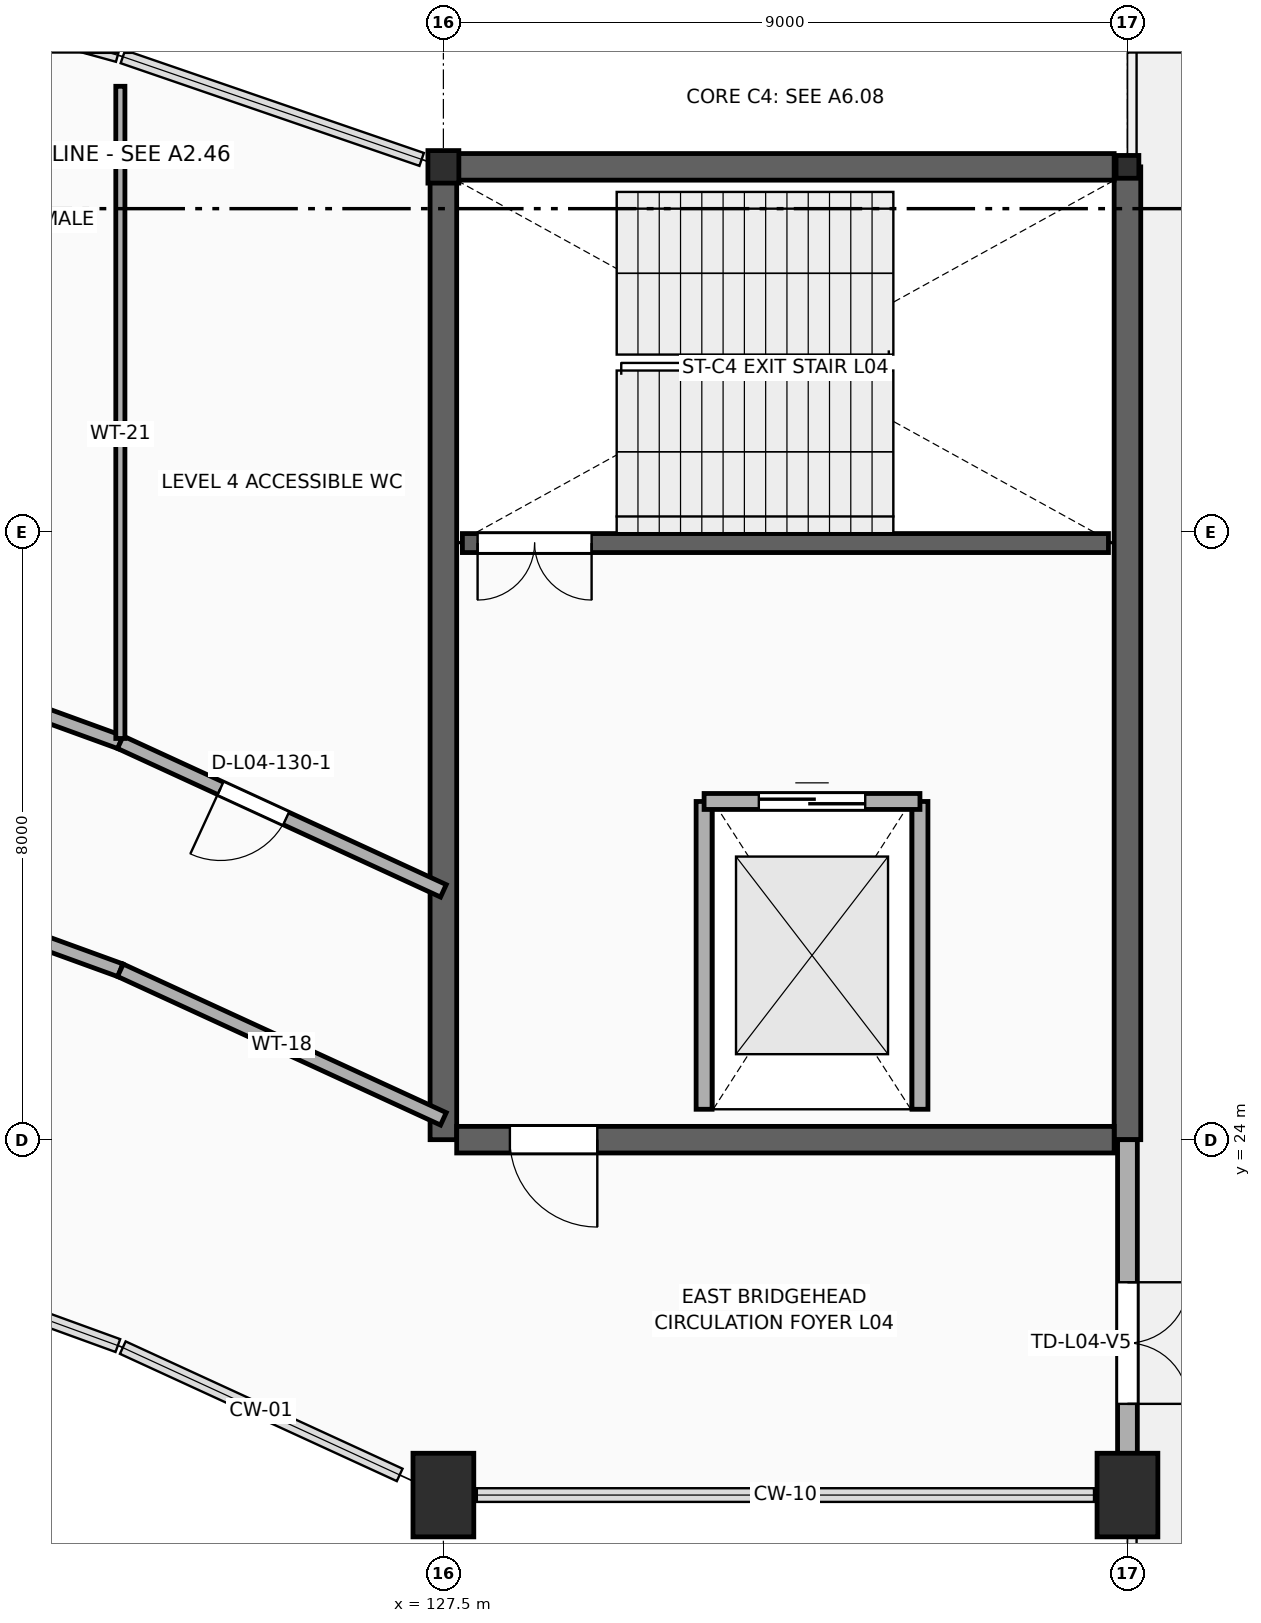
"""IFC4 building model, lengths in metres.
Left out: names, types, materials, properties, quantities, classifications, styles, units other than length and angle.
Written with IfcOpenShell. Run it as: python <this file> out.ifc"""

import sys

from ifc_helpers import new_model, si_unit, direction, frame, frame_2d, origin, origin_2d, place, context, subcontext, project, spatial, rectangle, i_section, extrude, element, fill, save


model = new_model("IFC4")
c1 = context("Model", 3, precision=1e-05, world=origin(), true_north=direction((0.0, 1.0)))
c2 = subcontext(c1, "Body", "Model", "MODEL_VIEW")
j1 = project(units=[si_unit("LENGTHUNIT", "METRE"), si_unit("PLANEANGLEUNIT", "RADIAN")], contexts=[c1])
p1 = place(None, origin())
s1 = spatial("IfcSite", under=j1, at=p1, CompositionType="ELEMENT")
p2 = place(p1, origin())
s2 = spatial("IfcBuilding", under=s1, at=p2, CompositionType="ELEMENT")
p3 = place(p2, frame((0.0, 0.0, 19.8)))
s3 = spatial("IfcBuildingStorey", under=s2, at=p3, CompositionType="ELEMENT", Elevation=19.8)
for number, where, z_axis, x_axis in (
    (1, (127.5, 24.0, 0.0), (0.0, 0.0, 1.0), (0.0, 1.0, 0.0)),
    (2, (136.5, 24.0, 0.0), (0.0, 0.0, 1.0), (0.0, 1.0, 0.0)),
):
    element("IfcWall", number, at=place(p3, frame(where, z_axis=z_axis, x_axis=x_axis)), inside=s3, PredefinedType="SHEAR", context=c2, shape_type="SweptSolid", body=[
        extrude(rectangle(XDim=12.8, YDim=0.35, at=frame_2d((6.4, 0.0))), origin(), (0.0, 0.0, 1.0), 4.64),
    ])
p4 = place(p3, frame((127.675, 36.8, 0.0), z_axis=(0.0, 0.0, 1.0), x_axis=(1.0, 0.0, 0.0)))
e3 = element("IfcWall", 3, at=p4, inside=s3, PredefinedType="SHEAR", context=c2, shape_type="SweptSolid", body=[
    extrude(rectangle(XDim=8.65, YDim=0.35, at=frame_2d((4.325, 0.0))), origin(), (0.0, 0.0, 1.0), 4.64),
])
p5 = place(p3, frame((127.675, 24.0, 0.0), z_axis=(0.0, 0.0, 1.0), x_axis=(1.0, 0.0, 0.0)))
e4 = element("IfcWall", 4, at=p5, inside=s3, PredefinedType="SHEAR", context=c2, shape_type="SweptSolid", body=[
    extrude(rectangle(XDim=8.65, YDim=0.35, at=frame_2d((4.325, 0.0))), origin(), (0.0, 0.0, 1.0), 4.64),
])
p6 = place(p5, frame((0.7, 0.0, 0.0)))
e5 = element("IfcOpeningElement", 5, at=p6, cuts=e4, PredefinedType="OPENING", context=c2, shape_type="SweptSolid", body=[
    extrude(rectangle(XDim=1.15, YDim=2.2, at=frame_2d((0.575, 1.1))), frame((0.0, 0.187, 0.0), z_axis=(0.0, -1.0, 0.0), x_axis=(1.0, 0.0, 0.0)), (0.0, 0.0, 1.0), 0.374),
])
p7 = place(p3, frame((127.75, 31.85, 0.0), z_axis=(0.0, 0.0, 1.0), x_axis=(1.0, 0.0, 0.0)))
e6 = element("IfcWall", 6, at=p7, inside=s3, PredefinedType="STANDARD", context=c2, shape_type="SweptSolid", body=[
    extrude(rectangle(XDim=8.5, YDim=0.25, at=frame_2d((4.25, 0.0))), origin(), (0.0, 0.0, 1.0), 4.64),
])
p8 = place(p7, frame((0.2, 0.0, 0.0)))
e7 = element("IfcOpeningElement", 7, at=p8, cuts=e6, PredefinedType="OPENING", context=c2, shape_type="SweptSolid", body=[
    extrude(rectangle(XDim=1.5, YDim=2.2, at=frame_2d((0.75, 1.1))), frame((0.0, 0.137, 0.0), z_axis=(0.0, -1.0, 0.0), x_axis=(1.0, 0.0, 0.0)), (0.0, 0.0, 1.0), 0.274),
])
for number, where, z_axis, x_axis in (
    (8, (130.93, 24.4, 0.0), (0.0, 0.0, 1.0), (0.0, 1.0, 0.0)),
    (9, (133.77, 24.4, 0.0), (0.0, 0.0, 1.0), (0.0, 1.0, 0.0)),
):
    element("IfcWall", number, at=place(p3, frame(where, z_axis=z_axis, x_axis=x_axis)), inside=s3, PredefinedType="PARTITIONING", context=c2, shape_type="SweptSolid", body=[
        extrude(rectangle(XDim=4.05, YDim=0.21, at=frame_2d((2.025, 0.0))), origin(), (0.0, 0.0, 1.0), 4.64),
    ])
p9 = place(p3, frame((130.93, 28.45, 0.0), z_axis=(0.0, 0.0, 1.0), x_axis=(1.0, 0.0, 0.0)))
e10 = element("IfcWall", 10, at=p9, inside=s3, PredefinedType="PARTITIONING", context=c2, shape_type="SweptSolid", body=[
    extrude(rectangle(XDim=2.84, YDim=0.21, at=frame_2d((1.42, 0.0))), origin(), (0.0, 0.0, 1.0), 4.64),
])
p10 = place(p9, frame((0.72, 0.0, 0.0)))
e11 = element("IfcOpeningElement", 11, at=p10, cuts=e10, PredefinedType="OPENING", context=c2, shape_type="SweptSolid", body=[
    extrude(rectangle(XDim=1.4, YDim=2.35, at=frame_2d((0.7, 1.175))), frame((0.0, 0.117, 0.0), z_axis=(0.0, -1.0, 0.0), x_axis=(1.0, 0.0, 0.0)), (0.0, 0.0, 1.0), 0.234),
])
p11 = place(p3, frame((127.5, 36.8, 0.0), z_axis=(0.0, 0.0, 1.0), x_axis=(1.0, 0.0, 0.0)))
e12 = element("IfcColumn", 12, at=p11, inside=s3, PredefinedType="COLUMN", context=c2, shape_type="SweptSolid", body=[
    extrude(i_section(OverallWidth=0.407, OverallDepth=0.428, WebThickness=0.02, FlangeThickness=0.035, at=origin_2d()), origin(), (0.0, 0.0, 1.0), 4.54),
])
p12 = place(p3, frame((136.5, 36.8, 0.0), z_axis=(0.0, 0.0, 1.0), x_axis=(1.0, 0.0, 0.0)))
e13 = element("IfcColumn", 13, at=p12, inside=s3, PredefinedType="COLUMN", context=c2, shape_type="SweptSolid", body=[
    extrude(i_section(OverallWidth=0.3, OverallDepth=0.3, WebThickness=0.01, FlangeThickness=0.015, at=origin_2d()), origin(), (0.0, 0.0, 1.0), 4.54),
])
for number, where, z_axis, x_axis in (
    (14, (136.5, 19.324, 0.0), (0.0, 0.0, 1.0), (1.0, 0.0, 0.0)),
    (15, (127.5, 19.324, 0.0), (0.0, 0.0, 1.0), (1.0, 0.0, 0.0)),
):
    element("IfcColumn", number, at=place(p3, frame(where, z_axis=z_axis, x_axis=x_axis)), inside=s3, PredefinedType="COLUMN", context=c2, shape_type="SweptSolid", body=[
        extrude(rectangle(XDim=0.8, YDim=1.1, at=origin_2d()), origin(), (0.0, 0.0, 1.0), 4.54),
    ])
p13 = place(p3, frame((136.5, 19.324, 0.0), z_axis=(0.0, 0.0, 1.0), x_axis=(0.0, 1.0, 0.0)))
e16 = element("IfcWall", 16, at=p13, inside=s3, PredefinedType="STANDARD", context=c2, shape_type="SweptSolid", body=[
    extrude(rectangle(XDim=4.676, YDim=0.26, at=frame_2d((2.338, 0.0))), origin(), (0.0, 0.0, 1.0), 4.168),
])
p14 = place(p13, frame((1.2, 0.0, 0.0)))
e17 = element("IfcOpeningElement", 17, at=p14, cuts=e16, PredefinedType="OPENING", context=c2, shape_type="SweptSolid", body=[
    extrude(rectangle(XDim=1.6, YDim=2.3, at=frame_2d((0.8, 1.15))), frame((0.0, 0.142, 0.0), z_axis=(0.0, -1.0, 0.0), x_axis=(1.0, 0.0, 0.0)), (0.0, 0.0, 1.0), 0.284),
])
p15 = place(p3, frame((119.0, 27.774, 0.0), z_axis=(0.0, 0.0, 1.0), x_axis=(0.939831249065, -0.341639024821, 0.0)))
e18 = element("IfcWall", 18, at=p15, inside=s3, PredefinedType="PARTITIONING", context=c2, shape_type="SweptSolid", body=[
    extrude(rectangle(XDim=4.522, YDim=0.18, at=frame_2d((2.261, 0.0))), origin(), (0.0, 0.0, 1.0), 3.668),
])
p16 = place(p3, frame((119.0, 30.774, 0.0), z_axis=(0.0, 0.0, 1.0), x_axis=(0.939831249065, -0.341639024821, 0.0)))
e19 = element("IfcWall", 19, at=p16, inside=s3, PredefinedType="PARTITIONING", context=c2, shape_type="SweptSolid", body=[
    extrude(rectangle(XDim=4.522, YDim=0.18, at=frame_2d((2.261, 0.0))), origin(), (0.0, 0.0, 1.0), 3.668),
])
p17 = place(p16, frame((1.45, 0.0, 0.0)))
e20 = element("IfcOpeningElement", 20, at=p17, cuts=e19, PredefinedType="OPENING", context=c2, shape_type="SweptSolid", body=[
    extrude(rectangle(XDim=0.9, YDim=2.15, at=frame_2d((0.45, 1.075))), frame((0.0, 0.102, 0.0), z_axis=(0.0, -1.0, 0.0), x_axis=(1.0, 0.0, 0.0)), (0.0, 0.0, 1.0), 0.204),
])
p18 = place(p3, frame((123.25, 26.229, 0.0), z_axis=(0.0, 0.0, 1.0), x_axis=(0.908484112169, -0.417919391673, 0.0)))
e21 = element("IfcWall", 21, at=p18, inside=s3, PredefinedType="PARTITIONING", context=c2, shape_type="SweptSolid", body=[
    extrude(rectangle(XDim=4.678, YDim=0.18, at=frame_2d((2.339, 0.0))), origin(), (0.0, 0.0, 1.0), 3.668),
])
p19 = place(p3, frame((123.25, 29.229, 0.0), z_axis=(0.0, 0.0, 1.0), x_axis=(0.908484112169, -0.417919391673, 0.0)))
e22 = element("IfcWall", 22, at=p19, inside=s3, PredefinedType="PARTITIONING", context=c2, shape_type="SweptSolid", body=[
    extrude(rectangle(XDim=4.678, YDim=0.18, at=frame_2d((2.339, 0.0))), origin(), (0.0, 0.0, 1.0), 3.668),
])
p20 = place(p19, frame((1.45, 0.0, 0.0)))
e23 = element("IfcOpeningElement", 23, at=p20, cuts=e22, PredefinedType="OPENING", context=c2, shape_type="SweptSolid", body=[
    extrude(rectangle(XDim=0.95, YDim=2.15, at=frame_2d((0.475, 1.075))), frame((0.0, 0.102, 0.0), z_axis=(0.0, -1.0, 0.0), x_axis=(1.0, 0.0, 0.0)), (0.0, 0.0, 1.0), 0.204),
])
p21 = place(p3, frame((123.25, 29.279, 0.0), z_axis=(0.0, 0.0, 1.0), x_axis=(0.0, 1.0, 0.0)))
e24 = element("IfcWall", 24, at=p21, inside=s3, PredefinedType="PARTITIONING", context=c2, shape_type="SweptSolid", body=[
    extrude(rectangle(XDim=8.581, YDim=0.12, at=frame_2d((4.291, 0.0))), origin(), (0.0, 0.0, 1.0), 3.668),
])
p22 = place(p8, frame((1.5, 0.0, 0.0), z_axis=(0.0, 0.0, 1.0), x_axis=(-1.0, 0.0, 0.0)))
e25 = element("IfcDoor", 25, at=p22, inside=s3, OperationType="DOUBLE_DOOR_SINGLE_SWING", PredefinedType="DOOR", context=c2, shape_type="SweptSolid", body=[
    extrude(rectangle(XDim=1.5, YDim=2.2, at=frame_2d((0.75, 1.1))), frame((0.0, 0.025, 0.0), z_axis=(0.0, -1.0, 0.0), x_axis=(1.0, 0.0, 0.0)), (0.0, 0.0, 1.0), 0.05),
])
fill(e7, e25)
p23 = place(p10, origin())
e26 = element("IfcDoor", 26, at=p23, inside=s3, OperationType="DOUBLE_DOOR_SLIDING", PredefinedType="DOOR", context=c2, shape_type="SweptSolid", body=[
    extrude(rectangle(XDim=1.4, YDim=2.35, at=frame_2d((0.7, 1.175))), frame((0.0, 0.025, 0.0), z_axis=(0.0, -1.0, 0.0), x_axis=(1.0, 0.0, 0.0)), (0.0, 0.0, 1.0), 0.05),
])
fill(e11, e26)
p24 = place(p6, frame((1.15, 0.0, 0.0), z_axis=(0.0, 0.0, 1.0), x_axis=(-1.0, 0.0, 0.0)))
e27 = element("IfcDoor", 27, at=p24, inside=s3, OperationType="SINGLE_SWING_RIGHT", PredefinedType="DOOR", context=c2, shape_type="SweptSolid", body=[
    extrude(rectangle(XDim=1.15, YDim=2.2, at=frame_2d((0.575, 1.1))), frame((0.0, 0.025, 0.0), z_axis=(0.0, -1.0, 0.0), x_axis=(1.0, 0.0, 0.0)), (0.0, 0.0, 1.0), 0.05),
])
fill(e5, e27)
p25 = place(p14, frame((1.6, 0.0, 0.0), z_axis=(0.0, 0.0, 1.0), x_axis=(-1.0, 0.0, 0.0)))
e28 = element("IfcDoor", 28, at=p25, inside=s3, OperationType="DOUBLE_DOOR_SINGLE_SWING", PredefinedType="DOOR", context=c2, shape_type="SweptSolid", body=[
    extrude(rectangle(XDim=1.6, YDim=2.3, at=frame_2d((0.8, 1.15))), frame((0.0, 0.025, 0.0), z_axis=(0.0, -1.0, 0.0), x_axis=(1.0, 0.0, 0.0)), (0.0, 0.0, 1.0), 0.05),
])
fill(e17, e28)
p26 = place(p20, frame((0.95, 0.0, 0.0), z_axis=(0.0, 0.0, 1.0), x_axis=(-1.0, 0.0, 0.0)))
e29 = element("IfcDoor", 29, at=p26, inside=s3, OperationType="SINGLE_SWING_LEFT", PredefinedType="DOOR", context=c2, shape_type="SweptSolid", body=[
    extrude(rectangle(XDim=0.95, YDim=2.15, at=frame_2d((0.475, 1.075))), frame((0.0, 0.025, 0.0), z_axis=(0.0, -1.0, 0.0), x_axis=(1.0, 0.0, 0.0)), (0.0, 0.0, 1.0), 0.05),
])
fill(e23, e29)
save(model, sys.argv[1])
